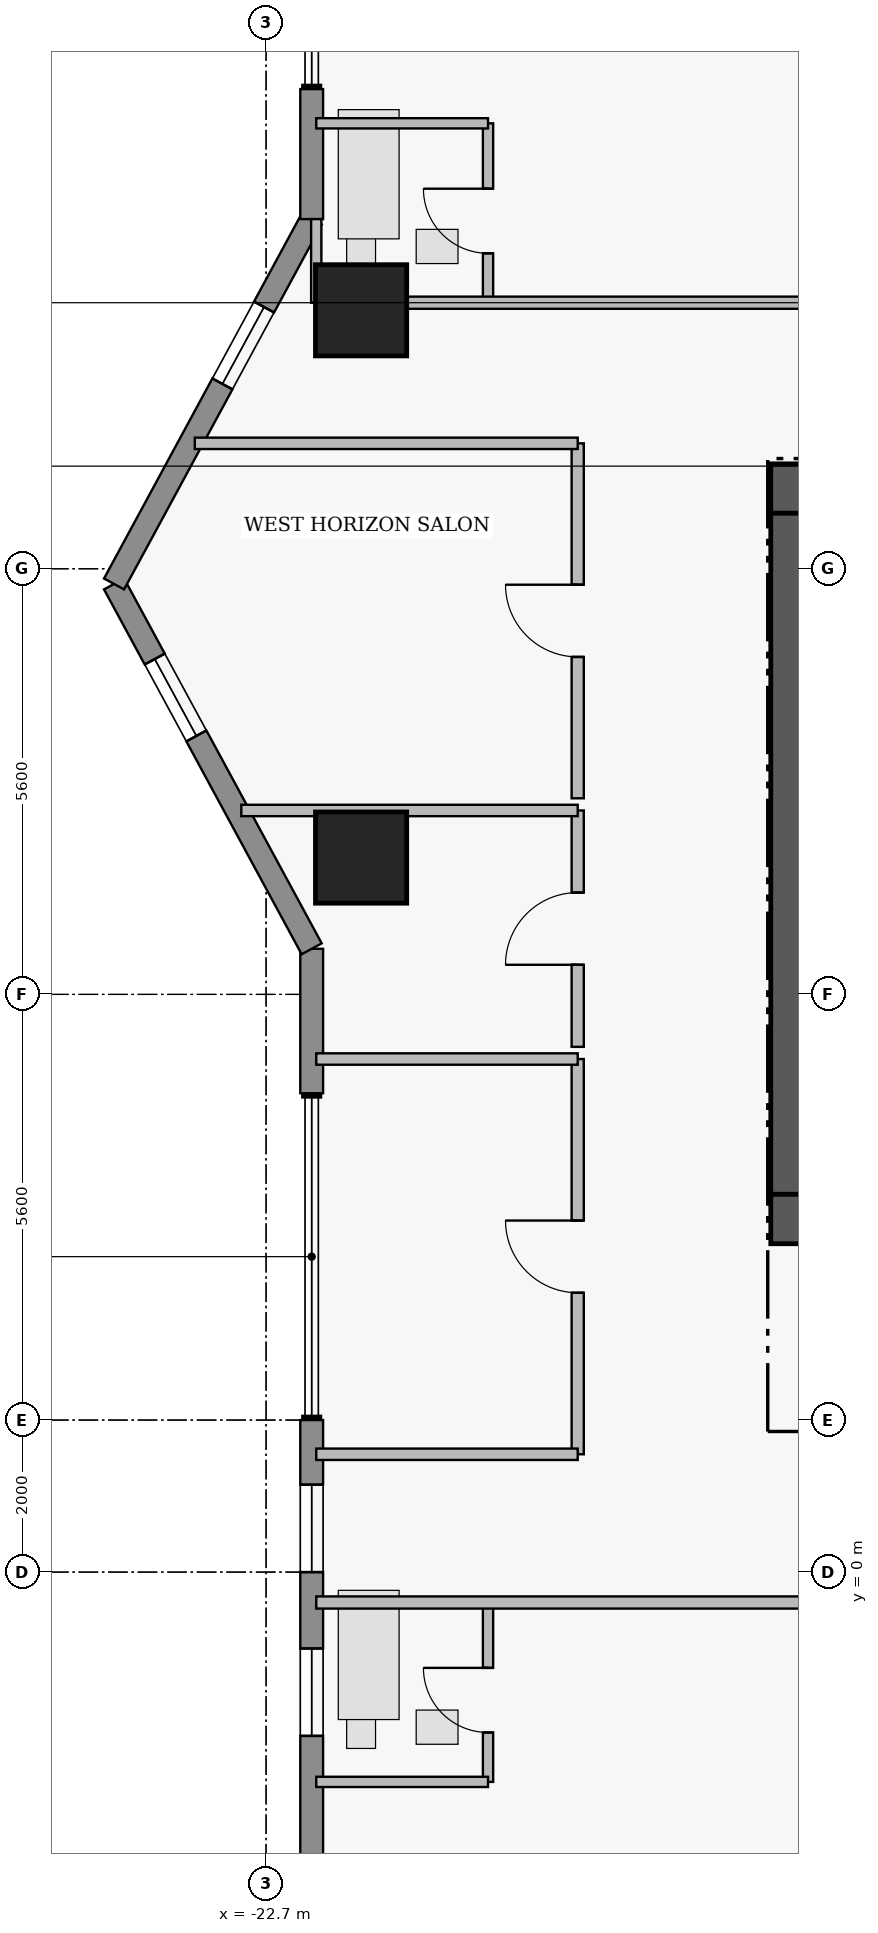
"""IFC4 building model, lengths in metres.
Left out: names, types, materials, properties, quantities, classifications, styles, units other than length and angle.
Written with IfcOpenShell. Run it as: python <this file> out.ifc"""

import sys

from ifc_helpers import new_model, si_unit, direction, frame, frame_2d, origin, origin_2d, place, context, subcontext, project, spatial, rectangle, extrude, element, fill, save


model = new_model("IFC4")
c1 = context("Model", 3, precision=1e-05, world=origin(), true_north=direction((0.0, 1.0)))
c2 = subcontext(c1, "Body", "Model", "MODEL_VIEW")
j1 = project(units=[si_unit("LENGTHUNIT", "METRE"), si_unit("PLANEANGLEUNIT", "RADIAN")], contexts=[c1])
p1 = place(None, origin())
s1 = spatial("IfcSite", under=j1, at=p1, CompositionType="ELEMENT")
p2 = place(p1, origin())
s2 = spatial("IfcBuilding", under=s1, at=p2, CompositionType="ELEMENT")
p3 = place(p2, frame((0.0, 0.0, 222.4)))
s3 = spatial("IfcBuildingStorey", under=s2, at=p3, CompositionType="ELEMENT", Elevation=222.4)
p4 = place(p3, frame((-16.06, 14.255, 0.0), z_axis=(0.0, 0.0, 1.0), x_axis=(1.0, 0.0, 0.0)))
e1 = element("IfcWall", 1, at=p4, inside=s3, PredefinedType="SHEAR", context=c2, shape_type="SweptSolid", body=[
    extrude(rectangle(XDim=4.46, YDim=0.65, at=frame_2d((2.23, 0.0))), origin(), (0.0, 0.0, 1.0), 3.56),
])
p5 = place(p3, frame((-15.735, 4.97, 0.0), z_axis=(0.0, 0.0, 1.0), x_axis=(0.0, 1.0, 0.0)))
e2 = element("IfcWall", 2, at=p5, inside=s3, PredefinedType="SHEAR", context=c2, shape_type="SweptSolid", body=[
    extrude(rectangle(XDim=8.96, YDim=0.65, at=frame_2d((4.48, 0.0))), origin(), (0.0, 0.0, 1.0), 3.56),
])
p6 = place(p3, frame((-16.06, 4.645, 0.0), z_axis=(0.0, 0.0, 1.0), x_axis=(1.0, 0.0, 0.0)))
e3 = element("IfcWall", 3, at=p6, inside=s3, PredefinedType="SHEAR", context=c2, shape_type="SweptSolid", body=[
    extrude(rectangle(XDim=4.46, YDim=0.65, at=frame_2d((2.23, 0.0))), origin(), (0.0, 0.0, 1.0), 3.56),
])
for number, where, z_axis, x_axis in (
    (4, (-21.45, 9.4, 0.0), (0.0, 0.0, 1.0), (1.0, 0.0, 0.0)),
    (5, (-21.45, 16.6, 0.0), (0.0, 0.0, 1.0), (1.0, 0.0, 0.0)),
):
    element("IfcColumn", number, at=place(p3, frame(where, z_axis=z_axis, x_axis=x_axis)), inside=s3, PredefinedType="COLUMN", context=c2, shape_type="SweptSolid", body=[
        extrude(rectangle(XDim=1.2, YDim=1.2, at=origin_2d()), origin(), (0.0, 0.0, 1.0), 3.75),
    ])
p7 = place(p3, frame((-22.1, -4.2, 0.0), z_axis=(0.0, 0.0, 1.0), x_axis=(0.0, 1.0, 0.0)))
e6 = element("IfcWall", 6, at=p7, inside=s3, PredefinedType="STANDARD", context=c2, shape_type="SweptSolid", body=[
    extrude(rectangle(XDim=6.2, YDim=0.3, at=frame_2d((3.1, 0.0))), origin(), (0.0, 0.0, 1.0), 3.53),
])
p8 = place(p7, frame((2.045, 0.0, 0.95)))
e7 = element("IfcOpeningElement", 7, at=p8, cuts=e6, PredefinedType="OPENING", context=c2, shape_type="SweptSolid", body=[
    extrude(rectangle(XDim=1.15, YDim=1.55, at=frame_2d((0.575, 0.775))), frame((0.0, 0.16, 0.0), z_axis=(0.0, -1.0, 0.0), x_axis=(1.0, 0.0, 0.0)), (0.0, 0.0, 1.0), 0.32),
])
p9 = place(p7, frame((4.2, 0.0, 0.95)))
e8 = element("IfcOpeningElement", 8, at=p9, cuts=e6, PredefinedType="OPENING", context=c2, shape_type="SweptSolid", body=[
    extrude(rectangle(XDim=1.15, YDim=1.55, at=frame_2d((0.575, 0.775))), frame((0.0, 0.16, 0.0), z_axis=(0.0, -1.0, 0.0), x_axis=(1.0, 0.0, 0.0)), (0.0, 0.0, 1.0), 0.32),
])
p10 = place(p3, frame((-22.1, 6.3, 0.0), z_axis=(0.0, 0.0, 1.0), x_axis=(0.0, 1.0, 0.0)))
e9 = element("IfcWall", 9, at=p10, inside=s3, PredefinedType="STANDARD", context=c2, shape_type="SweptSolid", body=[
    extrude(rectangle(XDim=1.9, YDim=0.3, at=frame_2d((0.95, 0.0))), origin(), (0.0, 0.0, 1.0), 3.53),
])
p11 = place(p3, frame((-22.1, 8.2, 0.0), z_axis=(0.0, 0.0, 1.0), x_axis=(-0.476258655584, 0.879305233114, 0.0)))
e10 = element("IfcWall", 10, at=p11, inside=s3, PredefinedType="STANDARD", context=c2, shape_type="SweptSolid", body=[
    extrude(rectangle(XDim=5.459, YDim=0.3, at=frame_2d((2.729, 0.0))), origin(), (0.0, 0.0, 1.0), 3.53),
])
p12 = place(p11, frame((3.185, 0.0, 1.25)))
e11 = element("IfcOpeningElement", 11, at=p12, cuts=e10, PredefinedType="OPENING", context=c2, shape_type="SweptSolid", body=[
    extrude(rectangle(XDim=1.15, YDim=1.55, at=frame_2d((0.575, 0.775))), frame((0.0, 0.16, 0.0), z_axis=(0.0, -1.0, 0.0), x_axis=(1.0, 0.0, 0.0)), (0.0, 0.0, 1.0), 0.32),
])
p13 = place(p3, frame((-24.7, 13.0, 0.0), z_axis=(0.0, 0.0, 1.0), x_axis=(0.476258655584, 0.879305233114, 0.0)))
e12 = element("IfcWall", 12, at=p13, inside=s3, PredefinedType="STANDARD", context=c2, shape_type="SweptSolid", body=[
    extrude(rectangle(XDim=5.459, YDim=0.3, at=frame_2d((2.729, 0.0))), origin(), (0.0, 0.0, 1.0), 3.53),
])
p14 = place(p13, frame((2.993, 0.0, 1.25)))
e13 = element("IfcOpeningElement", 13, at=p14, cuts=e12, PredefinedType="OPENING", context=c2, shape_type="SweptSolid", body=[
    extrude(rectangle(XDim=1.15, YDim=1.55, at=frame_2d((0.575, 0.775))), frame((0.0, 0.16, 0.0), z_axis=(0.0, -1.0, 0.0), x_axis=(1.0, 0.0, 0.0)), (0.0, 0.0, 1.0), 0.32),
])
p15 = place(p3, frame((-22.1, 17.8, 0.0), z_axis=(0.0, 0.0, 1.0), x_axis=(0.0, 1.0, 0.0)))
e14 = element("IfcWall", 14, at=p15, inside=s3, PredefinedType="STANDARD", context=c2, shape_type="SweptSolid", body=[
    extrude(rectangle(XDim=1.71, YDim=0.3, at=frame_2d((0.855, 0.0))), origin(), (0.0, 0.0, 1.0), 3.53),
])
p16 = place(p3, frame((-19.78, 16.7, 0.0), z_axis=(0.0, 0.0, 1.0), x_axis=(0.0, 1.0, 0.0)))
e15 = element("IfcWall", 15, at=p16, inside=s3, PredefinedType="PLUMBINGWALL", context=c2, shape_type="SweptSolid", body=[
    extrude(rectangle(XDim=2.36, YDim=0.135, at=frame_2d((1.18, 0.0))), origin(), (0.0, 0.0, 1.0), 3.53),
])
p17 = place(p16, frame((0.65, 0.0, 0.0)))
e16 = element("IfcOpeningElement", 16, at=p17, cuts=e15, PredefinedType="OPENING", context=c2, shape_type="SweptSolid", body=[
    extrude(rectangle(XDim=0.85, YDim=2.1, at=frame_2d((0.425, 1.05))), frame((0.0, 0.077, 0.0), z_axis=(0.0, -1.0, 0.0), x_axis=(1.0, 0.0, 0.0)), (0.0, 0.0, 1.0), 0.155),
])
p18 = place(p3, frame((-22.04, 16.7, 0.0), z_axis=(0.0, 0.0, 1.0), x_axis=(1.0, 0.0, 0.0)))
e17 = element("IfcWall", 17, at=p18, inside=s3, PredefinedType="PARTITIONING", context=c2, shape_type="SweptSolid", body=[
    extrude(rectangle(XDim=13.24, YDim=0.16, at=frame_2d((6.62, 0.0))), origin(), (0.0, 0.0, 1.0), 3.124),
])
p19 = place(p18, frame((7.365, 0.0, 0.0)))
e18 = element("IfcOpeningElement", 18, at=p19, cuts=e17, PredefinedType="OPENING", context=c2, shape_type="SweptSolid", body=[
    extrude(rectangle(XDim=1.0, YDim=2.15, at=frame_2d((0.5, 1.075))), frame((0.0, 0.09, 0.0), z_axis=(0.0, -1.0, 0.0), x_axis=(1.0, 0.0, 0.0)), (0.0, 0.0, 1.0), 0.18),
])
p20 = place(p3, frame((-19.78, -2.76, 0.0), z_axis=(0.0, 0.0, 1.0), x_axis=(0.0, 1.0, 0.0)))
e19 = element("IfcWall", 19, at=p20, inside=s3, PredefinedType="PLUMBINGWALL", context=c2, shape_type="SweptSolid", body=[
    extrude(rectangle(XDim=2.36, YDim=0.135, at=frame_2d((1.18, 0.0))), origin(), (0.0, 0.0, 1.0), 3.53),
])
p21 = place(p20, frame((0.65, 0.0, 0.0)))
e20 = element("IfcOpeningElement", 20, at=p21, cuts=e19, PredefinedType="OPENING", context=c2, shape_type="SweptSolid", body=[
    extrude(rectangle(XDim=0.85, YDim=2.1, at=frame_2d((0.425, 1.05))), frame((0.0, 0.077, 0.0), z_axis=(0.0, -1.0, 0.0), x_axis=(1.0, 0.0, 0.0)), (0.0, 0.0, 1.0), 0.155),
])
p22 = place(p3, frame((-22.04, -0.4, 0.0), z_axis=(0.0, 0.0, 1.0), x_axis=(1.0, 0.0, 0.0)))
e21 = element("IfcWall", 21, at=p22, inside=s3, PredefinedType="PARTITIONING", context=c2, shape_type="SweptSolid", body=[
    extrude(rectangle(XDim=12.84, YDim=0.16, at=frame_2d((6.42, 0.0))), origin(), (0.0, 0.0, 1.0), 3.53),
])
p23 = place(p22, frame((7.07, 0.0, 0.0)))
e22 = element("IfcOpeningElement", 22, at=p23, cuts=e21, PredefinedType="OPENING", context=c2, shape_type="SweptSolid", body=[
    extrude(rectangle(XDim=1.0, YDim=2.15, at=frame_2d((0.5, 1.075))), frame((0.0, 0.09, 0.0), z_axis=(0.0, -1.0, 0.0), x_axis=(1.0, 0.0, 0.0)), (0.0, 0.0, 1.0), 0.18),
])
p24 = place(p3, frame((-18.6, 1.55, 0.0), z_axis=(0.0, 0.0, 1.0), x_axis=(0.0, 1.0, 0.0)))
e23 = element("IfcWall", 23, at=p24, inside=s3, PredefinedType="PARTITIONING", context=c2, shape_type="SweptSolid", body=[
    extrude(rectangle(XDim=5.2, YDim=0.16, at=frame_2d((2.6, 0.0))), origin(), (0.0, 0.0, 1.0), 3.53),
])
p25 = place(p24, frame((2.125, 0.0, 0.0)))
e24 = element("IfcOpeningElement", 24, at=p25, cuts=e23, PredefinedType="OPENING", context=c2, shape_type="SweptSolid", body=[
    extrude(rectangle(XDim=0.95, YDim=2.15, at=frame_2d((0.475, 1.075))), frame((0.0, 0.09, 0.0), z_axis=(0.0, -1.0, 0.0), x_axis=(1.0, 0.0, 0.0)), (0.0, 0.0, 1.0), 0.18),
])
p26 = place(p3, frame((-18.6, 6.91, 0.0), z_axis=(0.0, 0.0, 1.0), x_axis=(0.0, 1.0, 0.0)))
e25 = element("IfcWall", 25, at=p26, inside=s3, PredefinedType="PARTITIONING", context=c2, shape_type="SweptSolid", body=[
    extrude(rectangle(XDim=3.11, YDim=0.16, at=frame_2d((1.555, 0.0))), origin(), (0.0, 0.0, 1.0), 3.53),
])
p27 = place(p26, frame((1.08, 0.0, 0.0)))
e26 = element("IfcOpeningElement", 26, at=p27, cuts=e25, PredefinedType="OPENING", context=c2, shape_type="SweptSolid", body=[
    extrude(rectangle(XDim=0.95, YDim=2.15, at=frame_2d((0.475, 1.075))), frame((0.0, 0.09, 0.0), z_axis=(0.0, -1.0, 0.0), x_axis=(1.0, 0.0, 0.0)), (0.0, 0.0, 1.0), 0.18),
])
p28 = place(p3, frame((-18.6, 10.18, 0.0), z_axis=(0.0, 0.0, 1.0), x_axis=(0.0, 1.0, 0.0)))
e27 = element("IfcWall", 27, at=p28, inside=s3, PredefinedType="PARTITIONING", context=c2, shape_type="SweptSolid", body=[
    extrude(rectangle(XDim=4.67, YDim=0.16, at=frame_2d((2.335, 0.0))), origin(), (0.0, 0.0, 1.0), 3.53),
])
p29 = place(p28, frame((1.86, 0.0, 0.0)))
e28 = element("IfcOpeningElement", 28, at=p29, cuts=e27, PredefinedType="OPENING", context=c2, shape_type="SweptSolid", body=[
    extrude(rectangle(XDim=0.95, YDim=2.15, at=frame_2d((0.475, 1.075))), frame((0.0, 0.09, 0.0), z_axis=(0.0, -1.0, 0.0), x_axis=(1.0, 0.0, 0.0)), (0.0, 0.0, 1.0), 0.18),
])
p30 = place(p3, frame((-22.04, 19.06, 0.0), z_axis=(0.0, 0.0, 1.0), x_axis=(1.0, 0.0, 0.0)))
e29 = element("IfcWall", 29, at=p30, inside=s3, PredefinedType="PLUMBINGWALL", context=c2, shape_type="SweptSolid", body=[
    extrude(rectangle(XDim=2.26, YDim=0.135, at=frame_2d((1.13, 0.0))), origin(), (0.0, 0.0, 1.0), 3.53),
])
p31 = place(p3, frame((-22.04, 16.7, 0.0), z_axis=(0.0, 0.0, 1.0), x_axis=(0.0, 1.0, 0.0)))
e30 = element("IfcWall", 30, at=p31, inside=s3, PredefinedType="PLUMBINGWALL", context=c2, shape_type="SweptSolid", body=[
    extrude(rectangle(XDim=1.1, YDim=0.135, at=frame_2d((0.55, 0.0))), origin(), (0.0, 0.0, 1.0), 3.53),
])
p32 = place(p3, frame((-22.04, -2.76, 0.0), z_axis=(0.0, 0.0, 1.0), x_axis=(1.0, 0.0, 0.0)))
e31 = element("IfcWall", 31, at=p32, inside=s3, PredefinedType="PLUMBINGWALL", context=c2, shape_type="SweptSolid", body=[
    extrude(rectangle(XDim=2.26, YDim=0.135, at=frame_2d((1.13, 0.0))), origin(), (0.0, 0.0, 1.0), 3.53),
])
for number, where, z_axis, x_axis in (
    (32, (-22.04, 1.55, 0.0), (0.0, 0.0, 1.0), (1.0, 0.0, 0.0)),
    (33, (-22.04, 6.75, 0.0), (0.0, 0.0, 1.0), (1.0, 0.0, 0.0)),
):
    element("IfcWall", number, at=place(p3, frame(where, z_axis=z_axis, x_axis=x_axis)), inside=s3, PredefinedType="PARTITIONING", context=c2, shape_type="SweptSolid", body=[
        extrude(rectangle(XDim=3.44, YDim=0.15, at=frame_2d((1.72, 0.0))), origin(), (0.0, 0.0, 1.0), 3.53),
    ])
p33 = place(p3, frame((-23.026, 10.02, 0.0), z_axis=(0.0, 0.0, 1.0), x_axis=(1.0, 0.0, 0.0)))
e34 = element("IfcWall", 34, at=p33, inside=s3, PredefinedType="PARTITIONING", context=c2, shape_type="SweptSolid", body=[
    extrude(rectangle(XDim=4.426, YDim=0.15, at=frame_2d((2.213, 0.0))), origin(), (0.0, 0.0, 1.0), 3.53),
])
p34 = place(p3, frame((-23.638, 14.85, 0.0), z_axis=(0.0, 0.0, 1.0), x_axis=(1.0, 0.0, 0.0)))
e35 = element("IfcWall", 35, at=p34, inside=s3, PredefinedType="PARTITIONING", context=c2, shape_type="SweptSolid", body=[
    extrude(rectangle(XDim=5.038, YDim=0.15, at=frame_2d((2.519, 0.0))), origin(), (0.0, 0.0, 1.0), 3.53),
])
p35 = place(p8, origin())
e36 = element("IfcWindow", 36, at=p35, inside=s3, PartitioningType="SINGLE_PANEL", PredefinedType="WINDOW", context=c2, shape_type="SweptSolid", body=[
    extrude(rectangle(XDim=1.15, YDim=1.55, at=frame_2d((0.575, 0.775))), frame((0.0, 0.03, 0.0), z_axis=(0.0, -1.0, 0.0), x_axis=(1.0, 0.0, 0.0)), (0.0, 0.0, 1.0), 0.06),
])
fill(e7, e36)
p36 = place(p9, origin())
e37 = element("IfcWindow", 37, at=p36, inside=s3, PartitioningType="SINGLE_PANEL", PredefinedType="WINDOW", context=c2, shape_type="SweptSolid", body=[
    extrude(rectangle(XDim=1.15, YDim=1.55, at=frame_2d((0.575, 0.775))), frame((0.0, 0.03, 0.0), z_axis=(0.0, -1.0, 0.0), x_axis=(1.0, 0.0, 0.0)), (0.0, 0.0, 1.0), 0.06),
])
fill(e8, e37)
p37 = place(p12, origin())
e38 = element("IfcWindow", 38, at=p37, inside=s3, PartitioningType="SINGLE_PANEL", PredefinedType="WINDOW", context=c2, shape_type="SweptSolid", body=[
    extrude(rectangle(XDim=1.15, YDim=1.55, at=frame_2d((0.575, 0.775))), frame((0.0, 0.03, 0.0), z_axis=(0.0, -1.0, 0.0), x_axis=(1.0, 0.0, 0.0)), (0.0, 0.0, 1.0), 0.06),
])
fill(e11, e38)
p38 = place(p14, origin())
e39 = element("IfcWindow", 39, at=p38, inside=s3, PartitioningType="SINGLE_PANEL", PredefinedType="WINDOW", context=c2, shape_type="SweptSolid", body=[
    extrude(rectangle(XDim=1.15, YDim=1.55, at=frame_2d((0.575, 0.775))), frame((0.0, 0.03, 0.0), z_axis=(0.0, -1.0, 0.0), x_axis=(1.0, 0.0, 0.0)), (0.0, 0.0, 1.0), 0.06),
])
fill(e13, e39)
p39 = place(p17, origin())
e40 = element("IfcDoor", 40, at=p39, inside=s3, OperationType="SINGLE_SWING_RIGHT", PredefinedType="DOOR", context=c2, shape_type="SweptSolid", body=[
    extrude(rectangle(XDim=0.85, YDim=2.1, at=frame_2d((0.425, 1.05))), frame((0.0, 0.025, 0.0), z_axis=(0.0, -1.0, 0.0), x_axis=(1.0, 0.0, 0.0)), (0.0, 0.0, 1.0), 0.05),
])
fill(e16, e40)
p40 = place(p21, origin())
e41 = element("IfcDoor", 41, at=p40, inside=s3, OperationType="SINGLE_SWING_RIGHT", PredefinedType="DOOR", context=c2, shape_type="SweptSolid", body=[
    extrude(rectangle(XDim=0.85, YDim=2.1, at=frame_2d((0.425, 1.05))), frame((0.0, 0.025, 0.0), z_axis=(0.0, -1.0, 0.0), x_axis=(1.0, 0.0, 0.0)), (0.0, 0.0, 1.0), 0.05),
])
fill(e20, e41)
p41 = place(p25, origin())
e42 = element("IfcDoor", 42, at=p41, inside=s3, OperationType="SINGLE_SWING_RIGHT", PredefinedType="DOOR", context=c2, shape_type="SweptSolid", body=[
    extrude(rectangle(XDim=0.95, YDim=2.15, at=frame_2d((0.475, 1.075))), frame((0.0, 0.025, 0.0), z_axis=(0.0, -1.0, 0.0), x_axis=(1.0, 0.0, 0.0)), (0.0, 0.0, 1.0), 0.05),
])
fill(e24, e42)
p42 = place(p27, origin())
e43 = element("IfcDoor", 43, at=p42, inside=s3, OperationType="SINGLE_SWING_LEFT", PredefinedType="DOOR", context=c2, shape_type="SweptSolid", body=[
    extrude(rectangle(XDim=0.95, YDim=2.15, at=frame_2d((0.475, 1.075))), frame((0.0, 0.025, 0.0), z_axis=(0.0, -1.0, 0.0), x_axis=(1.0, 0.0, 0.0)), (0.0, 0.0, 1.0), 0.05),
])
fill(e26, e43)
p43 = place(p29, origin())
e44 = element("IfcDoor", 44, at=p43, inside=s3, OperationType="SINGLE_SWING_RIGHT", PredefinedType="DOOR", context=c2, shape_type="SweptSolid", body=[
    extrude(rectangle(XDim=0.95, YDim=2.15, at=frame_2d((0.475, 1.075))), frame((0.0, 0.025, 0.0), z_axis=(0.0, -1.0, 0.0), x_axis=(1.0, 0.0, 0.0)), (0.0, 0.0, 1.0), 0.05),
])
fill(e28, e44)
save(model, sys.argv[1])
